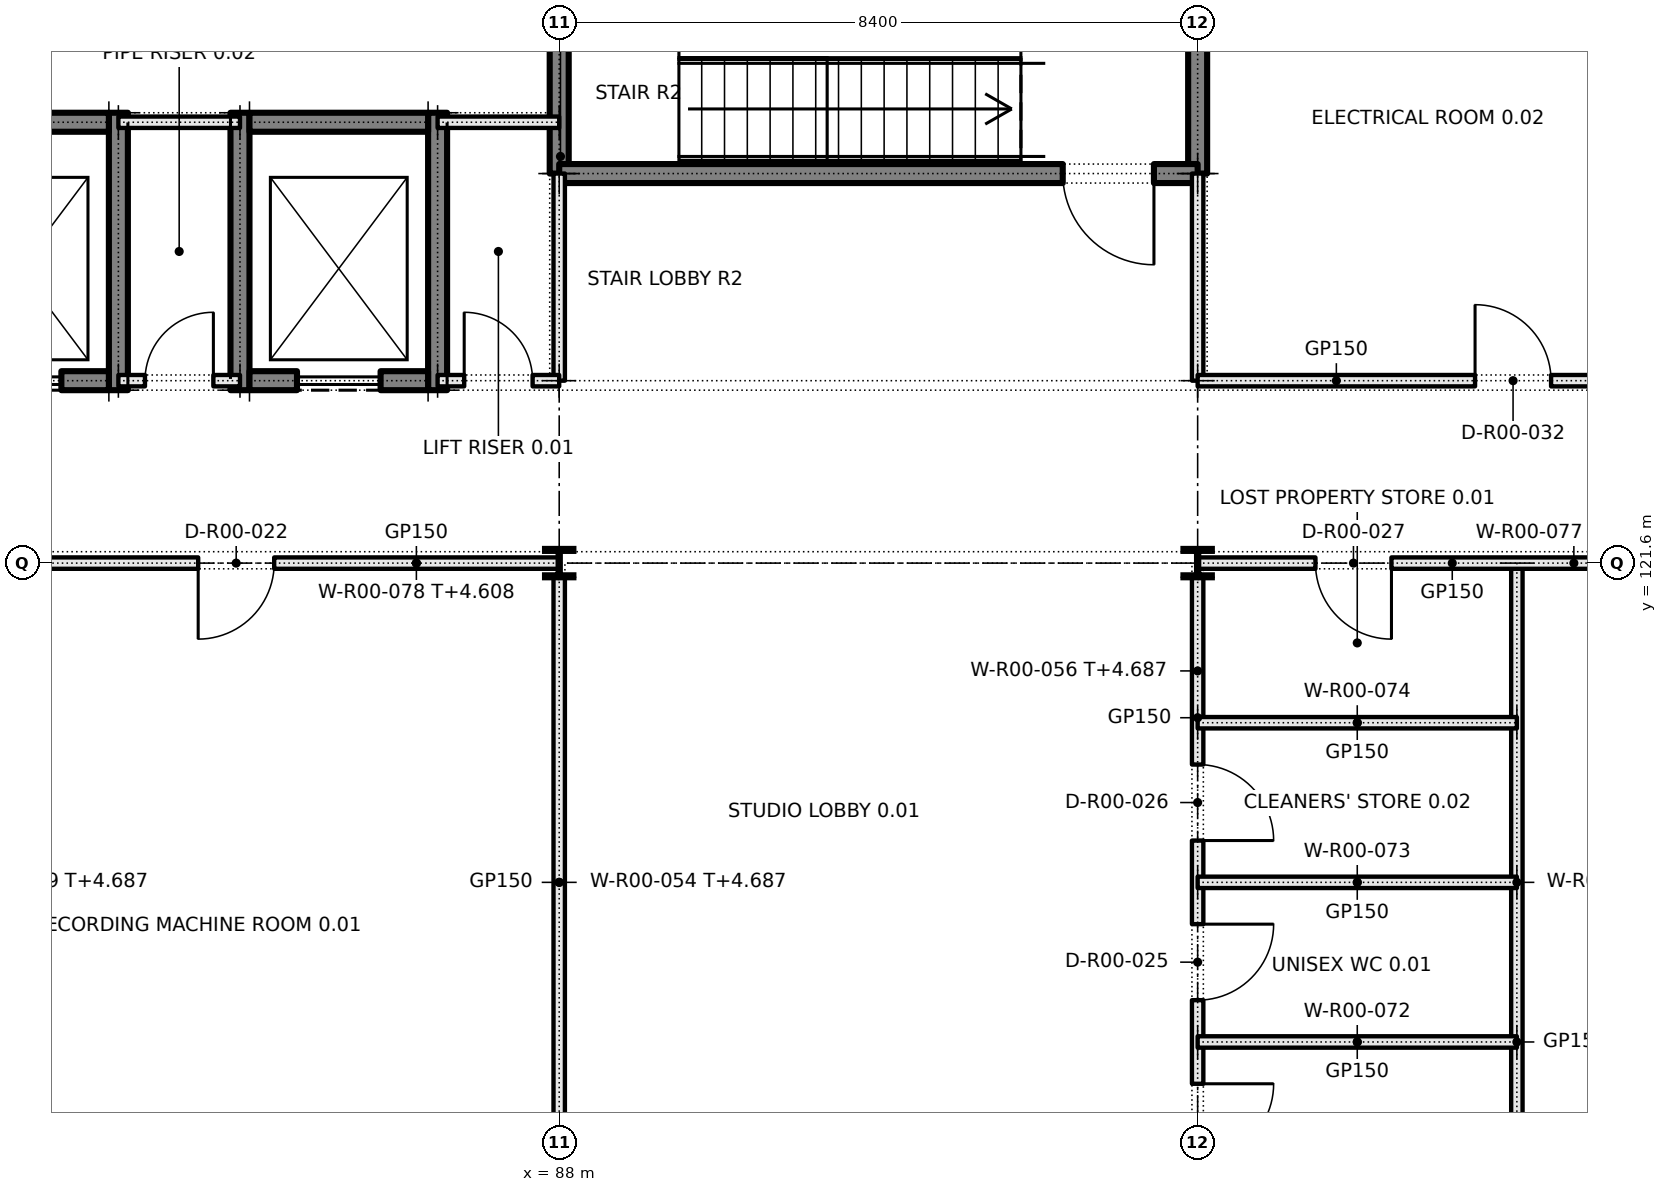
"""IFC4 building model, lengths in metres.
Left out: names, types, materials, properties, quantities, classifications, styles, units other than length and angle.
Written with IfcOpenShell. Run it as: python <this file> out.ifc"""

import sys

from ifc_helpers import new_model, si_unit, direction, frame, frame_2d, origin, origin_2d, place, context, subcontext, project, spatial, rectangle, i_section, extrude, element, fill, save


model = new_model("IFC4")
c1 = context("Model", 3, precision=1e-05, world=origin(), true_north=direction((0.0, 1.0)))
c2 = subcontext(c1, "Body", "Model", "MODEL_VIEW")
j1 = project(units=[si_unit("LENGTHUNIT", "METRE"), si_unit("PLANEANGLEUNIT", "RADIAN")], contexts=[c1])
p1 = place(None, origin())
s1 = spatial("IfcSite", under=j1, at=p1, CompositionType="ELEMENT")
p2 = place(p1, origin())
s2 = spatial("IfcBuilding", under=s1, at=p2, CompositionType="ELEMENT")
p3 = place(p2, origin())
s3 = spatial("IfcBuildingStorey", under=s2, at=p3, CompositionType="ELEMENT", Elevation=0.0)
p4 = place(p3, frame((82.2, 123.875, 0.0), z_axis=(0.0, 0.0, 1.0), x_axis=(0.0, 1.0, 0.0)))
e1 = element("IfcWall", 1, at=p4, inside=s3, PredefinedType="SOLIDWALL", context=c2, shape_type="SweptSolid", body=[
    extrude(rectangle(XDim=3.65, YDim=0.25, at=frame_2d((1.825, 0.0))), origin(), (0.0, 0.0, 1.0), 5.4),
])
p5 = place(p3, frame((79.725, 124.0, 0.0), z_axis=(0.0, 0.0, 1.0), x_axis=(1.0, 0.0, 0.0)))
e2 = element("IfcWall", 2, at=p5, inside=s3, PredefinedType="SOLIDWALL", context=c2, shape_type="SweptSolid", body=[
    extrude(rectangle(XDim=2.35, YDim=0.25, at=frame_2d((1.175, 0.0))), origin(), (0.0, 0.0, 1.0), 5.4),
])
p6 = place(p5, frame((0.625, 0.0, 0.0)))
e3 = element("IfcOpeningElement", 3, at=p6, cuts=e2, PredefinedType="OPENING", context=c2, shape_type="SweptSolid", body=[
    extrude(rectangle(XDim=1.1, YDim=2.1, at=frame_2d((0.55, 1.05))), frame((0.0, 0.135, 0.0), z_axis=(0.0, -1.0, 0.0), x_axis=(1.0, 0.0, 0.0)), (0.0, 0.0, 1.0), 0.27),
])
p7 = place(p3, frame((79.725, 127.4, 0.0), z_axis=(0.0, 0.0, 1.0), x_axis=(1.0, 0.0, 0.0)))
e4 = element("IfcWall", 4, at=p7, inside=s3, PredefinedType="SOLIDWALL", context=c2, shape_type="SweptSolid", body=[
    extrude(rectangle(XDim=2.35, YDim=0.25, at=frame_2d((1.175, 0.0))), origin(), (0.0, 0.0, 1.0), 5.4),
])
for number, where, z_axis, x_axis in (
    (5, (83.8, 123.875, 0.0), (0.0, 0.0, 1.0), (0.0, 1.0, 0.0)),
    (6, (86.4, 123.875, 0.0), (0.0, 0.0, 1.0), (0.0, 1.0, 0.0)),
):
    element("IfcWall", number, at=place(p3, frame(where, z_axis=z_axis, x_axis=x_axis)), inside=s3, PredefinedType="SOLIDWALL", context=c2, shape_type="SweptSolid", body=[
        extrude(rectangle(XDim=3.65, YDim=0.25, at=frame_2d((1.825, 0.0))), origin(), (0.0, 0.0, 1.0), 5.4),
    ])
p8 = place(p3, frame((83.925, 124.0, 0.0), z_axis=(0.0, 0.0, 1.0), x_axis=(1.0, 0.0, 0.0)))
e7 = element("IfcWall", 7, at=p8, inside=s3, PredefinedType="SOLIDWALL", context=c2, shape_type="SweptSolid", body=[
    extrude(rectangle(XDim=2.35, YDim=0.25, at=frame_2d((1.175, 0.0))), origin(), (0.0, 0.0, 1.0), 5.4),
])
p9 = place(p8, frame((0.625, 0.0, 0.0)))
e8 = element("IfcOpeningElement", 8, at=p9, cuts=e7, PredefinedType="OPENING", context=c2, shape_type="SweptSolid", body=[
    extrude(rectangle(XDim=1.1, YDim=2.1, at=frame_2d((0.55, 1.05))), frame((0.0, 0.135, 0.0), z_axis=(0.0, -1.0, 0.0), x_axis=(1.0, 0.0, 0.0)), (0.0, 0.0, 1.0), 0.27),
])
p10 = place(p3, frame((83.925, 127.4, 0.0), z_axis=(0.0, 0.0, 1.0), x_axis=(1.0, 0.0, 0.0)))
e9 = element("IfcWall", 9, at=p10, inside=s3, PredefinedType="SOLIDWALL", context=c2, shape_type="SweptSolid", body=[
    extrude(rectangle(XDim=2.35, YDim=0.25, at=frame_2d((1.175, 0.0))), origin(), (0.0, 0.0, 1.0), 5.4),
])
for number, where, z_axis, x_axis in (
    (10, (88.0, 121.6, 0.0), (0.0, 0.0, 1.0), (1.0, 0.0, 0.0)),
    (11, (96.4, 121.6, 0.0), (0.0, 0.0, 1.0), (1.0, 0.0, 0.0)),
):
    element("IfcColumn", number, at=place(p3, frame(where, z_axis=z_axis, x_axis=x_axis)), inside=s3, PredefinedType="COLUMN", context=c2, shape_type="SweptSolid", body=[
        extrude(i_section(OverallWidth=0.373, OverallDepth=0.373, WebThickness=0.016, FlangeThickness=0.026, FilletRadius=0.015, at=origin_2d()), origin(), (0.0, 0.0, 1.0), 5.4),
    ])
for number, where, z_axis, x_axis in (
    (12, (88.0, 126.725, 0.0), (0.0, 0.0, 1.0), (0.0, 1.0, 0.0)),
    (13, (96.4, 126.725, 0.0), (0.0, 0.0, 1.0), (0.0, 1.0, 0.0)),
):
    element("IfcWall", number, at=place(p3, frame(where, z_axis=z_axis, x_axis=x_axis)), inside=s3, PredefinedType="SHEAR", context=c2, shape_type="SweptSolid", body=[
        extrude(rectangle(XDim=3.088, YDim=0.25, at=frame_2d((1.544, 0.0))), origin(), (0.0, 0.0, 1.0), 5.4),
    ])
p11 = place(p3, frame((88.0, 126.725, 0.0), z_axis=(0.0, 0.0, 1.0), x_axis=(1.0, 0.0, 0.0)))
e14 = element("IfcWall", 14, at=p11, inside=s3, PredefinedType="SHEAR", context=c2, shape_type="SweptSolid", body=[
    extrude(rectangle(XDim=8.4, YDim=0.25, at=frame_2d((4.2, 0.0))), origin(), (0.0, 0.0, 1.0), 5.4),
])
p12 = place(p11, frame((6.625, 0.0, 0.0)))
e15 = element("IfcOpeningElement", 15, at=p12, cuts=e14, PredefinedType="OPENING", context=c2, shape_type="SweptSolid", body=[
    extrude(rectangle(XDim=1.2, YDim=2.1, at=frame_2d((0.6, 1.05))), frame((0.0, 0.135, 0.0), z_axis=(0.0, -1.0, 0.0), x_axis=(1.0, 0.0, 0.0)), (0.0, 0.0, 1.0), 0.27),
])
p13 = place(p3, frame((88.0, 113.387, 0.0), z_axis=(0.0, 0.0, 1.0), x_axis=(0.0, 1.0, 0.0)))
e16 = element("IfcWall", 16, at=p13, inside=s3, PredefinedType="PARTITIONING", context=c2, shape_type="SweptSolid", body=[
    extrude(rectangle(XDim=8.027, YDim=0.15, at=frame_2d((4.013, 0.0))), origin(), (0.0, 0.0, 1.0), 4.687),
])
p14 = place(p3, frame((88.0, 124.0, 0.0), z_axis=(0.0, 0.0, 1.0), x_axis=(0.0, 1.0, 0.0)))
e17 = element("IfcWall", 17, at=p14, inside=s3, PredefinedType="PARTITIONING", context=c2, shape_type="SweptSolid", body=[
    extrude(rectangle(XDim=2.725, YDim=0.15, at=frame_2d((1.363, 0.0))), origin(), (0.0, 0.0, 1.0), 4.687),
])
p15 = place(p3, frame((96.4, 113.387, 0.0), z_axis=(0.0, 0.0, 1.0), x_axis=(0.0, 1.0, 0.0)))
e18 = element("IfcWall", 18, at=p15, inside=s3, PredefinedType="PARTITIONING", context=c2, shape_type="SweptSolid", body=[
    extrude(rectangle(XDim=8.027, YDim=0.15, at=frame_2d((4.013, 0.0))), origin(), (0.0, 0.0, 1.0), 4.687),
])
p16 = place(p15, frame((0.363, 0.0, 0.0)))
e19 = element("IfcOpeningElement", 19, at=p16, cuts=e18, PredefinedType="OPENING", context=c2, shape_type="SweptSolid", body=[
    extrude(rectangle(XDim=1.0, YDim=2.1, at=frame_2d((0.5, 1.05))), frame((0.0, 0.085, 0.0), z_axis=(0.0, -1.0, 0.0), x_axis=(1.0, 0.0, 0.0)), (0.0, 0.0, 1.0), 0.17),
])
p17 = place(p15, frame((2.463, 0.0, 0.0)))
e20 = element("IfcOpeningElement", 20, at=p17, cuts=e18, PredefinedType="OPENING", context=c2, shape_type="SweptSolid", body=[
    extrude(rectangle(XDim=1.0, YDim=2.1, at=frame_2d((0.5, 1.05))), frame((0.0, 0.085, 0.0), z_axis=(0.0, -1.0, 0.0), x_axis=(1.0, 0.0, 0.0)), (0.0, 0.0, 1.0), 0.17),
])
p18 = place(p15, frame((4.563, 0.0, 0.0)))
e21 = element("IfcOpeningElement", 21, at=p18, cuts=e18, PredefinedType="OPENING", context=c2, shape_type="SweptSolid", body=[
    extrude(rectangle(XDim=1.0, YDim=2.1, at=frame_2d((0.5, 1.05))), frame((0.0, 0.085, 0.0), z_axis=(0.0, -1.0, 0.0), x_axis=(1.0, 0.0, 0.0)), (0.0, 0.0, 1.0), 0.17),
])
p19 = place(p3, frame((96.4, 124.0, 0.0), z_axis=(0.0, 0.0, 1.0), x_axis=(0.0, 1.0, 0.0)))
e22 = element("IfcWall", 22, at=p19, inside=s3, PredefinedType="PARTITIONING", context=c2, shape_type="SweptSolid", body=[
    extrude(rectangle(XDim=2.725, YDim=0.15, at=frame_2d((1.363, 0.0))), origin(), (0.0, 0.0, 1.0), 4.687),
])
p20 = place(p3, frame((100.6, 113.2, 0.0), z_axis=(0.0, 0.0, 1.0), x_axis=(0.0, 1.0, 0.0)))
e23 = element("IfcWall", 23, at=p20, inside=s3, PredefinedType="PARTITIONING", context=c2, shape_type="SweptSolid", body=[
    extrude(rectangle(XDim=8.4, YDim=0.15, at=frame_2d((4.2, 0.0))), origin(), (0.0, 0.0, 1.0), 5.4),
])
for number, where, z_axis, x_axis in (
    (24, (96.4, 115.3, 0.0), (0.0, 0.0, 1.0), (1.0, 0.0, 0.0)),
    (25, (96.4, 117.4, 0.0), (0.0, 0.0, 1.0), (1.0, 0.0, 0.0)),
    (26, (96.4, 119.5, 0.0), (0.0, 0.0, 1.0), (1.0, 0.0, 0.0)),
):
    element("IfcWall", number, at=place(p3, frame(where, z_axis=z_axis, x_axis=x_axis)), inside=s3, PredefinedType="PARTITIONING", context=c2, shape_type="SweptSolid", body=[
        extrude(rectangle(XDim=4.2, YDim=0.15, at=frame_2d((2.1, 0.0))), origin(), (0.0, 0.0, 1.0), 5.4),
    ])
p21 = place(p3, frame((96.408, 121.6, 0.0), z_axis=(0.0, 0.0, 1.0), x_axis=(1.0, 0.0, 0.0)))
e27 = element("IfcWall", 27, at=p21, inside=s3, PredefinedType="PARTITIONING", context=c2, shape_type="SweptSolid", body=[
    extrude(rectangle(XDim=8.384, YDim=0.15, at=frame_2d((4.192, 0.0))), origin(), (0.0, 0.0, 1.0), 4.608),
])
p22 = place(p21, frame((1.542, 0.0, 0.0)))
e28 = element("IfcOpeningElement", 28, at=p22, cuts=e27, PredefinedType="OPENING", context=c2, shape_type="SweptSolid", body=[
    extrude(rectangle(XDim=1.0, YDim=2.1, at=frame_2d((0.5, 1.05))), frame((0.0, 0.085, 0.0), z_axis=(0.0, -1.0, 0.0), x_axis=(1.0, 0.0, 0.0)), (0.0, 0.0, 1.0), 0.17),
])
p23 = place(p21, frame((5.742, 0.0, 0.0)))
e29 = element("IfcOpeningElement", 29, at=p23, cuts=e27, PredefinedType="OPENING", context=c2, shape_type="SweptSolid", body=[
    extrude(rectangle(XDim=1.0, YDim=2.1, at=frame_2d((0.5, 1.05))), frame((0.0, 0.085, 0.0), z_axis=(0.0, -1.0, 0.0), x_axis=(1.0, 0.0, 0.0)), (0.0, 0.0, 1.0), 0.17),
])
p24 = place(p3, frame((79.592, 121.6, 0.0), z_axis=(0.0, 0.0, 1.0), x_axis=(1.0, 0.0, 0.0)))
e30 = element("IfcWall", 30, at=p24, inside=s3, PredefinedType="PARTITIONING", context=c2, shape_type="SweptSolid", body=[
    extrude(rectangle(XDim=8.4, YDim=0.15, at=frame_2d((4.2, 0.0))), origin(), (0.0, 0.0, 1.0), 4.608),
])
p25 = place(p24, frame((3.658, 0.0, 0.0)))
e31 = element("IfcOpeningElement", 31, at=p25, cuts=e30, PredefinedType="OPENING", context=c2, shape_type="SweptSolid", body=[
    extrude(rectangle(XDim=1.0, YDim=2.1, at=frame_2d((0.5, 1.05))), frame((0.0, 0.085, 0.0), z_axis=(0.0, -1.0, 0.0), x_axis=(1.0, 0.0, 0.0)), (0.0, 0.0, 1.0), 0.17),
])
p26 = place(p3, frame((96.4, 124.0, 0.0), z_axis=(0.0, 0.0, 1.0), x_axis=(1.0, 0.0, 0.0)))
e32 = element("IfcWall", 32, at=p26, inside=s3, PredefinedType="PARTITIONING", context=c2, shape_type="SweptSolid", body=[
    extrude(rectangle(XDim=8.4, YDim=0.15, at=frame_2d((4.2, 0.0))), origin(), (0.0, 0.0, 1.0), 5.4),
])
p27 = place(p26, frame((3.65, 0.0, 0.0)))
e33 = element("IfcOpeningElement", 33, at=p27, cuts=e32, PredefinedType="OPENING", context=c2, shape_type="SweptSolid", body=[
    extrude(rectangle(XDim=1.0, YDim=2.1, at=frame_2d((0.5, 1.05))), frame((0.0, 0.085, 0.0), z_axis=(0.0, -1.0, 0.0), x_axis=(1.0, 0.0, 0.0)), (0.0, 0.0, 1.0), 0.17),
])
p28 = place(p3, frame((82.2, 124.0, 0.0), z_axis=(0.0, 0.0, 1.0), x_axis=(1.0, 0.0, 0.0)))
e34 = element("IfcWall", 34, at=p28, inside=s3, PredefinedType="PARTITIONING", context=c2, shape_type="SweptSolid", body=[
    extrude(rectangle(XDim=1.6, YDim=0.15, at=frame_2d((0.8, 0.0))), origin(), (0.0, 0.0, 1.0), 5.4),
])
p29 = place(p28, frame((0.35, 0.0, 0.0)))
e35 = element("IfcOpeningElement", 35, at=p29, cuts=e34, PredefinedType="OPENING", context=c2, shape_type="SweptSolid", body=[
    extrude(rectangle(XDim=0.9, YDim=2.1, at=frame_2d((0.45, 1.05))), frame((0.0, 0.085, 0.0), z_axis=(0.0, -1.0, 0.0), x_axis=(1.0, 0.0, 0.0)), (0.0, 0.0, 1.0), 0.17),
])
p30 = place(p3, frame((86.4, 124.0, 0.0), z_axis=(0.0, 0.0, 1.0), x_axis=(1.0, 0.0, 0.0)))
e36 = element("IfcWall", 36, at=p30, inside=s3, PredefinedType="PARTITIONING", context=c2, shape_type="SweptSolid", body=[
    extrude(rectangle(XDim=1.6, YDim=0.15, at=frame_2d((0.8, 0.0))), origin(), (0.0, 0.0, 1.0), 5.4),
])
p31 = place(p30, frame((0.35, 0.0, 0.0)))
e37 = element("IfcOpeningElement", 37, at=p31, cuts=e36, PredefinedType="OPENING", context=c2, shape_type="SweptSolid", body=[
    extrude(rectangle(XDim=0.9, YDim=2.1, at=frame_2d((0.45, 1.05))), frame((0.0, 0.085, 0.0), z_axis=(0.0, -1.0, 0.0), x_axis=(1.0, 0.0, 0.0)), (0.0, 0.0, 1.0), 0.17),
])
for number, where, z_axis, x_axis in (
    (38, (82.2, 127.4, 0.0), (0.0, 0.0, 1.0), (1.0, 0.0, 0.0)),
    (39, (86.4, 127.4, 0.0), (0.0, 0.0, 1.0), (1.0, 0.0, 0.0)),
):
    element("IfcWall", number, at=place(p3, frame(where, z_axis=z_axis, x_axis=x_axis)), inside=s3, PredefinedType="PARTITIONING", context=c2, shape_type="SweptSolid", body=[
        extrude(rectangle(XDim=1.6, YDim=0.15, at=frame_2d((0.8, 0.0))), origin(), (0.0, 0.0, 1.0), 5.4),
    ])
p32 = place(p6, origin())
e40 = element("IfcDoor", 40, at=p32, inside=s3, OperationType="SLIDING_TO_LEFT", PredefinedType="DOOR", context=c2, shape_type="SweptSolid", body=[
    extrude(rectangle(XDim=1.1, YDim=2.1, at=frame_2d((0.55, 1.05))), frame((0.0, 0.025, 0.0), z_axis=(0.0, -1.0, 0.0), x_axis=(1.0, 0.0, 0.0)), (0.0, 0.0, 1.0), 0.05),
])
fill(e3, e40)
p33 = place(p9, origin())
e41 = element("IfcDoor", 41, at=p33, inside=s3, OperationType="SLIDING_TO_LEFT", PredefinedType="DOOR", context=c2, shape_type="SweptSolid", body=[
    extrude(rectangle(XDim=1.1, YDim=2.1, at=frame_2d((0.55, 1.05))), frame((0.0, 0.025, 0.0), z_axis=(0.0, -1.0, 0.0), x_axis=(1.0, 0.0, 0.0)), (0.0, 0.0, 1.0), 0.05),
])
fill(e8, e41)
p34 = place(p12, frame((1.2, 0.0, 0.0), z_axis=(0.0, 0.0, 1.0), x_axis=(-1.0, 0.0, 0.0)))
e42 = element("IfcDoor", 42, at=p34, inside=s3, OperationType="SINGLE_SWING_LEFT", PredefinedType="DOOR", context=c2, shape_type="SweptSolid", body=[
    extrude(rectangle(XDim=1.2, YDim=2.1, at=frame_2d((0.6, 1.05))), frame((0.0, 0.025, 0.0), z_axis=(0.0, -1.0, 0.0), x_axis=(1.0, 0.0, 0.0)), (0.0, 0.0, 1.0), 0.05),
])
fill(e15, e42)
p35 = place(p29, origin())
e43 = element("IfcDoor", 43, at=p35, inside=s3, OperationType="SINGLE_SWING_RIGHT", PredefinedType="DOOR", context=c2, shape_type="SweptSolid", body=[
    extrude(rectangle(XDim=0.9, YDim=2.1, at=frame_2d((0.45, 1.05))), frame((0.0, 0.025, 0.0), z_axis=(0.0, -1.0, 0.0), x_axis=(1.0, 0.0, 0.0)), (0.0, 0.0, 1.0), 0.05),
])
fill(e35, e43)
p36 = place(p31, origin())
e44 = element("IfcDoor", 44, at=p36, inside=s3, OperationType="SINGLE_SWING_LEFT", PredefinedType="DOOR", context=c2, shape_type="SweptSolid", body=[
    extrude(rectangle(XDim=0.9, YDim=2.1, at=frame_2d((0.45, 1.05))), frame((0.0, 0.025, 0.0), z_axis=(0.0, -1.0, 0.0), x_axis=(1.0, 0.0, 0.0)), (0.0, 0.0, 1.0), 0.05),
])
fill(e37, e44)
p37 = place(p25, frame((1.0, 0.0, 0.0), z_axis=(0.0, 0.0, 1.0), x_axis=(-1.0, 0.0, 0.0)))
e45 = element("IfcDoor", 45, at=p37, inside=s3, OperationType="SINGLE_SWING_RIGHT", PredefinedType="DOOR", context=c2, shape_type="SweptSolid", body=[
    extrude(rectangle(XDim=1.0, YDim=2.1, at=frame_2d((0.5, 1.05))), frame((0.0, 0.025, 0.0), z_axis=(0.0, -1.0, 0.0), x_axis=(1.0, 0.0, 0.0)), (0.0, 0.0, 1.0), 0.05),
])
fill(e31, e45)
p38 = place(p16, frame((1.0, 0.0, 0.0), z_axis=(0.0, 0.0, 1.0), x_axis=(-1.0, 0.0, 0.0)))
e46 = element("IfcDoor", 46, at=p38, inside=s3, OperationType="SINGLE_SWING_LEFT", PredefinedType="DOOR", context=c2, shape_type="SweptSolid", body=[
    extrude(rectangle(XDim=1.0, YDim=2.1, at=frame_2d((0.5, 1.05))), frame((0.0, 0.025, 0.0), z_axis=(0.0, -1.0, 0.0), x_axis=(1.0, 0.0, 0.0)), (0.0, 0.0, 1.0), 0.05),
])
fill(e19, e46)
p39 = place(p17, frame((1.0, 0.0, 0.0), z_axis=(0.0, 0.0, 1.0), x_axis=(-1.0, 0.0, 0.0)))
e47 = element("IfcDoor", 47, at=p39, inside=s3, OperationType="SINGLE_SWING_LEFT", PredefinedType="DOOR", context=c2, shape_type="SweptSolid", body=[
    extrude(rectangle(XDim=1.0, YDim=2.1, at=frame_2d((0.5, 1.05))), frame((0.0, 0.025, 0.0), z_axis=(0.0, -1.0, 0.0), x_axis=(1.0, 0.0, 0.0)), (0.0, 0.0, 1.0), 0.05),
])
fill(e20, e47)
p40 = place(p18, frame((1.0, 0.0, 0.0), z_axis=(0.0, 0.0, 1.0), x_axis=(-1.0, 0.0, 0.0)))
e48 = element("IfcDoor", 48, at=p40, inside=s3, OperationType="SINGLE_SWING_RIGHT", PredefinedType="DOOR", context=c2, shape_type="SweptSolid", body=[
    extrude(rectangle(XDim=1.0, YDim=2.1, at=frame_2d((0.5, 1.05))), frame((0.0, 0.025, 0.0), z_axis=(0.0, -1.0, 0.0), x_axis=(1.0, 0.0, 0.0)), (0.0, 0.0, 1.0), 0.05),
])
fill(e21, e48)
p41 = place(p22, frame((1.0, 0.0, 0.0), z_axis=(0.0, 0.0, 1.0), x_axis=(-1.0, 0.0, 0.0)))
e49 = element("IfcDoor", 49, at=p41, inside=s3, OperationType="SINGLE_SWING_LEFT", PredefinedType="DOOR", context=c2, shape_type="SweptSolid", body=[
    extrude(rectangle(XDim=1.0, YDim=2.1, at=frame_2d((0.5, 1.05))), frame((0.0, 0.025, 0.0), z_axis=(0.0, -1.0, 0.0), x_axis=(1.0, 0.0, 0.0)), (0.0, 0.0, 1.0), 0.05),
])
fill(e28, e49)
p42 = place(p27, origin())
e50 = element("IfcDoor", 50, at=p42, inside=s3, OperationType="SINGLE_SWING_LEFT", PredefinedType="DOOR", context=c2, shape_type="SweptSolid", body=[
    extrude(rectangle(XDim=1.0, YDim=2.1, at=frame_2d((0.5, 1.05))), frame((0.0, 0.025, 0.0), z_axis=(0.0, -1.0, 0.0), x_axis=(1.0, 0.0, 0.0)), (0.0, 0.0, 1.0), 0.05),
])
fill(e33, e50)
save(model, sys.argv[1])
